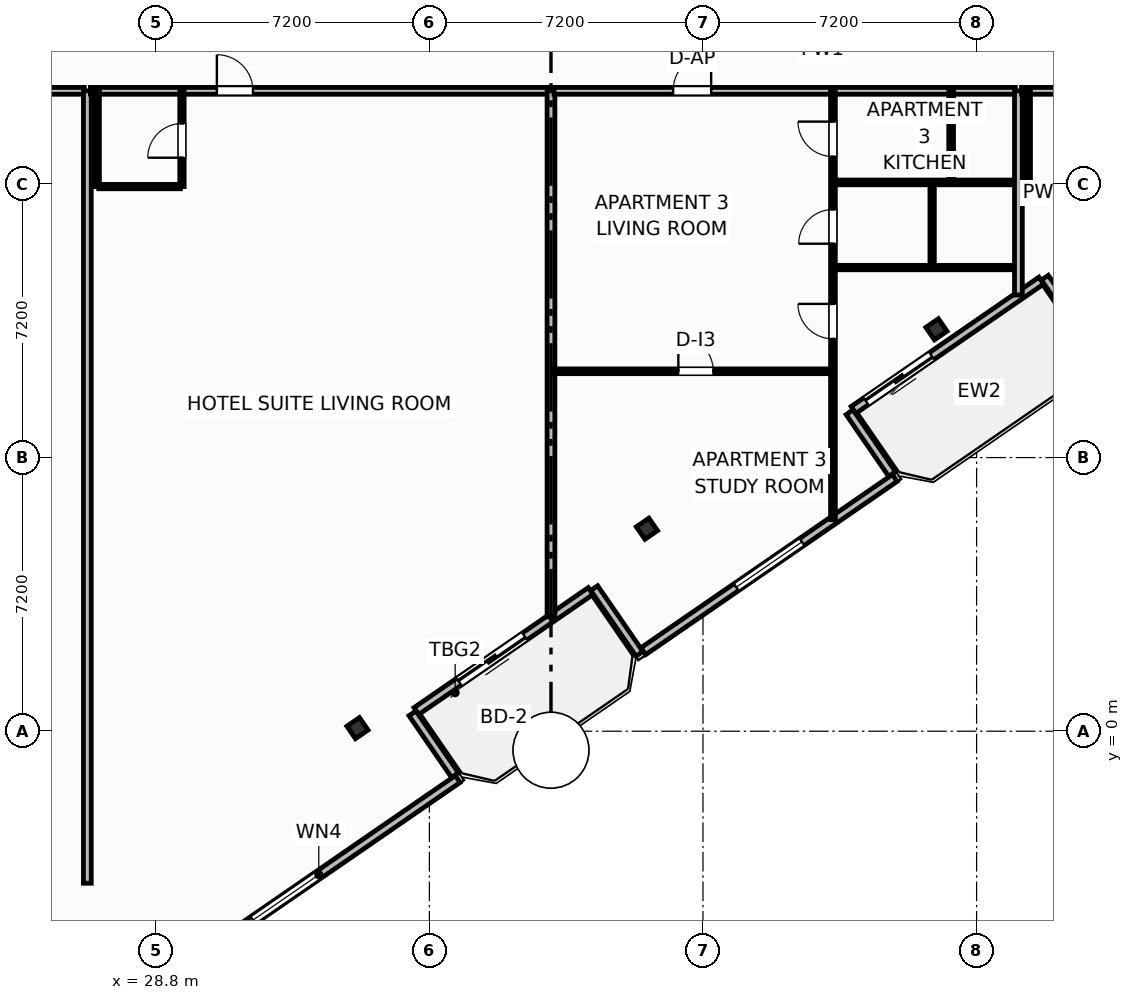
"""IFC4 building model, lengths in metres.
Left out: names, types, materials, properties, quantities, classifications, styles, units other than length and angle.
Written with IfcOpenShell. Run it as: python <this file> out.ifc"""

import sys

from ifc_helpers import new_model, si_unit, direction, frame, frame_2d, origin, origin_2d, place, context, subcontext, project, spatial, rectangle, i_section, extrude, element, fill, save


model = new_model("IFC4")
c1 = context("Model", 3, precision=1e-05, world=origin(), true_north=direction((0.0, 1.0)))
c2 = subcontext(c1, "Body", "Model", "MODEL_VIEW")
j1 = project(units=[si_unit("LENGTHUNIT", "METRE"), si_unit("PLANEANGLEUNIT", "RADIAN")], contexts=[c1])
p1 = place(None, origin())
s1 = spatial("IfcSite", under=j1, at=p1, CompositionType="ELEMENT")
p2 = place(p1, origin())
s2 = spatial("IfcBuilding", under=s1, at=p2, CompositionType="ELEMENT")
p3 = place(p2, frame((0.0, 0.0, 276.7)))
s3 = spatial("IfcBuildingStorey", under=s2, at=p3, CompositionType="ELEMENT", Elevation=276.7)
for number, where, z_axis, x_axis in (
    (1, (34.107, 0.081, 0.0), (0.0, 0.0, 1.0), (0.824, 0.567, 0.0)),
    (2, (41.725, 5.328, 0.0), (0.0, 0.0, 1.0), (0.824, 0.567, 0.0)),
    (3, (49.343, 10.575, 0.0), (0.0, 0.0, 1.0), (0.824, 0.567, 0.0)),
):
    element("IfcColumn", number, at=place(p3, frame(where, z_axis=z_axis, x_axis=x_axis)), inside=s3, PredefinedType="COLUMN", context=c2, shape_type="SweptSolid", body=[
        extrude(i_section(OverallWidth=0.401, OverallDepth=0.399, WebThickness=0.025, FlangeThickness=0.04, FilletRadius=0.022, at=origin_2d()), origin(), (0.0, 0.0, 1.0), 3.7),
    ])
p4 = place(p3, frame((40.244, 3.688, 0.0), z_axis=(0.0, 0.0, 1.0), x_axis=(-0.823541290762, -0.567256328665, 0.0)))
e4 = element("IfcWall", 4, at=p4, inside=s3, PredefinedType="SOLIDWALL", context=c2, shape_type="SweptSolid", body=[
    extrude(rectangle(XDim=5.567, YDim=0.22, at=frame_2d((2.784, 0.0))), origin(), (0.0, 0.0, 1.0), 2.73),
])
p5 = place(p4, frame((2.107, 0.0, 0.0)))
e5 = element("IfcOpeningElement", 5, at=p5, cuts=e4, PredefinedType="OPENING", context=c2, shape_type="SweptSolid", body=[
    extrude(rectangle(XDim=2.1, YDim=2.3, at=frame_2d((1.05, 1.15))), frame((0.0, 0.12, 0.0), z_axis=(0.0, -1.0, 0.0), x_axis=(1.0, 0.0, 0.0)), (0.0, 0.0, 1.0), 0.24),
])
p6 = place(p3, frame((52.103, 11.857, 0.0), z_axis=(0.0, 0.0, 1.0), x_axis=(-0.823534636215, -0.567265989598, 0.0)))
e6 = element("IfcWall", 6, at=p6, inside=s3, PredefinedType="SOLIDWALL", context=c2, shape_type="SweptSolid", body=[
    extrude(rectangle(XDim=6.0, YDim=0.22, at=frame_2d((3.0, 0.0))), origin(), (0.0, 0.0, 1.0), 2.73),
])
p7 = place(p6, frame((3.5, 0.0, 0.0)))
e7 = element("IfcOpeningElement", 7, at=p7, cuts=e6, PredefinedType="OPENING", context=c2, shape_type="SweptSolid", body=[
    extrude(rectangle(XDim=2.1, YDim=2.3, at=frame_2d((1.05, 1.15))), frame((0.0, 0.12, 0.0), z_axis=(0.0, -1.0, 0.0), x_axis=(1.0, 0.0, 0.0)), (0.0, 0.0, 1.0), 0.24),
])
p8 = place(p3, frame((27.704, -7.488, 0.0), z_axis=(0.0, 0.0, 1.0), x_axis=(0.823529068157, 0.567274073003, 0.0)))
e8 = element("IfcWall", 8, at=p8, inside=s3, PredefinedType="SOLIDWALL", context=c2, shape_type="SweptSolid", body=[
    extrude(rectangle(XDim=10.98, YDim=0.22, at=frame_2d((5.49, 0.0))), origin(), (0.0, 0.0, 1.0), 2.73),
])
p9 = place(p8, frame((4.44, 0.0, 0.8)))
e9 = element("IfcOpeningElement", 9, at=p9, cuts=e8, PredefinedType="OPENING", context=c2, shape_type="SweptSolid", body=[
    extrude(rectangle(XDim=2.1, YDim=1.75, at=frame_2d((1.05, 0.875))), frame((0.0, 0.12, 0.0), z_axis=(0.0, -1.0, 0.0), x_axis=(1.0, 0.0, 0.0)), (0.0, 0.0, 1.0), 0.24),
])
p10 = place(p3, frame((36.675, -1.156, 0.0), z_axis=(0.0, 0.0, 1.0), x_axis=(-0.567215821234, 0.823569190865, 0.0)))
e10 = element("IfcWall", 10, at=p10, inside=s3, PredefinedType="SOLIDWALL", context=c2, shape_type="SweptSolid", body=[
    extrude(rectangle(XDim=1.975, YDim=0.22, at=frame_2d((0.988, 0.0))), origin(), (0.0, 0.0, 1.0), 2.73),
])
p11 = place(p3, frame((40.337, 3.765, 0.0), z_axis=(0.0, 0.0, 1.0), x_axis=(0.567352541689, -0.823475010816, 0.0)))
e11 = element("IfcWall", 11, at=p11, inside=s3, PredefinedType="SOLIDWALL", context=c2, shape_type="SweptSolid", body=[
    extrude(rectangle(XDim=2.1, YDim=0.22, at=frame_2d((1.05, 0.0))), origin(), (0.0, 0.0, 1.0), 2.73),
])
p12 = place(p3, frame((41.631, 2.106, 0.0), z_axis=(0.0, 0.0, 1.0), x_axis=(0.823530942962, 0.56727135128, 0.0)))
e12 = element("IfcWall", 12, at=p12, inside=s3, PredefinedType="SOLIDWALL", context=c2, shape_type="SweptSolid", body=[
    extrude(rectangle(XDim=8.035, YDim=0.22, at=frame_2d((4.018, 0.0))), origin(), (0.0, 0.0, 1.0), 2.73),
])
p13 = place(p12, frame((2.968, 0.0, 0.8)))
e13 = element("IfcOpeningElement", 13, at=p13, cuts=e12, PredefinedType="OPENING", context=c2, shape_type="SweptSolid", body=[
    extrude(rectangle(XDim=2.1, YDim=1.75, at=frame_2d((1.05, 0.875))), frame((0.0, 0.12, 0.0), z_axis=(0.0, -1.0, 0.0), x_axis=(1.0, 0.0, 0.0)), (0.0, 0.0, 1.0), 0.24),
])
p14 = place(p3, frame((48.177, 6.767, 0.0), z_axis=(0.0, 0.0, 1.0), x_axis=(-0.567273565974, 0.823529417415, 0.0)))
e14 = element("IfcWall", 14, at=p14, inside=s3, PredefinedType="SOLIDWALL", context=c2, shape_type="SweptSolid", body=[
    extrude(rectangle(XDim=1.975, YDim=0.22, at=frame_2d((0.988, 0.0))), origin(), (0.0, 0.0, 1.0), 2.73),
])
p15 = place(p3, frame((52.196, 11.933, 0.0), z_axis=(0.0, 0.0, 1.0), x_axis=(0.56729822855, -0.823512428494, 0.0)))
e15 = element("IfcWall", 15, at=p15, inside=s3, PredefinedType="SOLIDWALL", context=c2, shape_type="SweptSolid", body=[
    extrude(rectangle(XDim=2.1, YDim=0.22, at=frame_2d((1.05, 0.0))), origin(), (0.0, 0.0, 1.0), 2.73),
])
p16 = place(p3, frame((5.038, 16.85, 0.0), z_axis=(0.0, 0.0, 1.0), x_axis=(1.0, 0.0, 0.0)))
e16 = element("IfcWall", 16, at=p16, inside=s3, PredefinedType="PARTITIONING", context=c2, shape_type="SweptSolid", body=[
    extrude(rectangle(XDim=21.882, YDim=0.18, at=frame_2d((10.941, 0.0))), origin(), (0.0, 0.0, 1.0), 2.739),
])
p17 = place(p16, frame((16.725, 0.0, 0.0)))
e17 = element("IfcOpeningElement", 17, at=p17, cuts=e16, PredefinedType="OPENING", context=c2, shape_type="SweptSolid", body=[
    extrude(rectangle(XDim=0.95, YDim=2.15, at=frame_2d((0.475, 1.075))), frame((0.0, 0.1, 0.0), z_axis=(0.0, -1.0, 0.0), x_axis=(1.0, 0.0, 0.0)), (0.0, 0.0, 1.0), 0.2),
])
p18 = place(p3, frame((27.0, -4.0, 0.0), z_axis=(0.0, 0.0, 1.0), x_axis=(0.0, 1.0, 0.0)))
e18 = element("IfcWall", 18, at=p18, inside=s3, PredefinedType="PARTITIONING", context=c2, shape_type="SweptSolid", body=[
    extrude(rectangle(XDim=20.85, YDim=0.205, at=frame_2d((10.425, 0.0))), origin(), (0.0, 0.0, 1.0), 3.45),
])
p19 = place(p3, frame((27.08, 16.85, 0.0), z_axis=(0.0, 0.0, 1.0), x_axis=(1.0, 0.0, 0.0)))
e19 = element("IfcWall", 19, at=p19, inside=s3, PredefinedType="PARTITIONING", context=c2, shape_type="SweptSolid", body=[
    extrude(rectangle(XDim=12.04, YDim=0.18, at=frame_2d((6.02, 0.0))), origin(), (0.0, 0.0, 1.0), 3.45),
])
p20 = place(p19, frame((3.328, 0.0, 0.0)))
e20 = element("IfcOpeningElement", 20, at=p20, cuts=e19, PredefinedType="OPENING", context=c2, shape_type="SweptSolid", body=[
    extrude(rectangle(XDim=0.95, YDim=2.15, at=frame_2d((0.475, 1.075))), frame((0.0, 0.1, 0.0), z_axis=(0.0, -1.0, 0.0), x_axis=(1.0, 0.0, 0.0)), (0.0, 0.0, 1.0), 0.2),
])
p21 = place(p3, frame((27.3, 14.33, 0.0), z_axis=(0.0, 0.0, 1.0), x_axis=(1.0, 0.0, 0.0)))
e21 = element("IfcWall", 21, at=p21, inside=s3, PredefinedType="PARTITIONING", context=c2, shape_type="SweptSolid", body=[
    extrude(rectangle(XDim=2.15, YDim=0.115, at=frame_2d((1.075, 0.0))), origin(), (0.0, 0.0, 1.0), 3.45),
])
p22 = place(p3, frame((29.49, 14.33, 0.0), z_axis=(0.0, 0.0, 1.0), x_axis=(0.0, 1.0, 0.0)))
e22 = element("IfcWall", 22, at=p22, inside=s3, PredefinedType="PARTITIONING", context=c2, shape_type="SweptSolid", body=[
    extrude(rectangle(XDim=2.52, YDim=0.115, at=frame_2d((1.26, 0.0))), origin(), (0.0, 0.0, 1.0), 3.45),
])
p23 = place(p22, frame((0.76, 0.0, 0.0)))
e23 = element("IfcOpeningElement", 23, at=p23, cuts=e22, PredefinedType="OPENING", context=c2, shape_type="SweptSolid", body=[
    extrude(rectangle(XDim=0.9, YDim=2.05, at=frame_2d((0.45, 1.025))), frame((0.0, 0.067, 0.0), z_axis=(0.0, -1.0, 0.0), x_axis=(1.0, 0.0, 0.0)), (0.0, 0.0, 1.0), 0.135),
])
p24 = place(p3, frame((27.26, 14.33, 0.0), z_axis=(0.0, 0.0, 1.0), x_axis=(0.0, 1.0, 0.0)))
e24 = element("IfcWall", 24, at=p24, inside=s3, PredefinedType="PARTITIONING", context=c2, shape_type="SweptSolid", body=[
    extrude(rectangle(XDim=2.52, YDim=0.115, at=frame_2d((1.26, 0.0))), origin(), (0.0, 0.0, 1.0), 3.45),
])
p25 = place(p3, frame((39.2, 3.006, 0.0), z_axis=(0.0, 0.0, 1.0), x_axis=(0.0, 1.0, 0.0)))
e25 = element("IfcWall", 25, at=p25, inside=s3, PredefinedType="PARTITIONING", context=c2, shape_type="SweptSolid", body=[
    extrude(rectangle(XDim=13.844, YDim=0.205, at=frame_2d((6.922, 0.0))), origin(), (0.0, 0.0, 1.0), 3.45),
])
p26 = place(p3, frame((39.28, 9.47, 0.0), z_axis=(0.0, 0.0, 1.0), x_axis=(1.0, 0.0, 0.0)))
e26 = element("IfcWall", 26, at=p26, inside=s3, PredefinedType="PARTITIONING", context=c2, shape_type="SweptSolid", body=[
    extrude(rectangle(XDim=7.27, YDim=0.125, at=frame_2d((3.635, 0.0))), origin(), (0.0, 0.0, 1.0), 3.45),
])
p27 = place(p26, frame((3.271, 0.0, 0.0)))
e27 = element("IfcOpeningElement", 27, at=p27, cuts=e26, PredefinedType="OPENING", context=c2, shape_type="SweptSolid", body=[
    extrude(rectangle(XDim=0.92, YDim=2.05, at=frame_2d((0.46, 1.025))), frame((0.0, 0.073, 0.0), z_axis=(0.0, -1.0, 0.0), x_axis=(1.0, 0.0, 0.0)), (0.0, 0.0, 1.0), 0.145),
])
p28 = place(p3, frame((39.28, 16.85, 0.0), z_axis=(0.0, 0.0, 1.0), x_axis=(1.0, 0.0, 0.0)))
e28 = element("IfcWall", 28, at=p28, inside=s3, PredefinedType="PARTITIONING", context=c2, shape_type="SweptSolid", body=[
    extrude(rectangle(XDim=12.14, YDim=0.18, at=frame_2d((6.07, 0.0))), origin(), (0.0, 0.0, 1.0), 3.45),
])
p29 = place(p28, frame((3.135, 0.0, 0.0)))
e29 = element("IfcOpeningElement", 29, at=p29, cuts=e28, PredefinedType="OPENING", context=c2, shape_type="SweptSolid", body=[
    extrude(rectangle(XDim=1.0, YDim=2.2, at=frame_2d((0.5, 1.1))), frame((0.0, 0.1, 0.0), z_axis=(0.0, -1.0, 0.0), x_axis=(1.0, 0.0, 0.0)), (0.0, 0.0, 1.0), 0.2),
])
p30 = place(p3, frame((46.62, 5.567, 0.0), z_axis=(0.0, 0.0, 1.0), x_axis=(0.0, 1.0, 0.0)))
e30 = element("IfcWall", 30, at=p30, inside=s3, PredefinedType="PARTITIONING", context=c2, shape_type="SweptSolid", body=[
    extrude(rectangle(XDim=11.283, YDim=0.125, at=frame_2d((5.642, 0.0))), origin(), (0.0, 0.0, 1.0), 3.45),
])
p31 = place(p30, frame((4.757, 0.0, 0.0)))
e31 = element("IfcOpeningElement", 31, at=p31, cuts=e30, PredefinedType="OPENING", context=c2, shape_type="SweptSolid", body=[
    extrude(rectangle(XDim=0.92, YDim=2.05, at=frame_2d((0.46, 1.025))), frame((0.0, 0.073, 0.0), z_axis=(0.0, -1.0, 0.0), x_axis=(1.0, 0.0, 0.0)), (0.0, 0.0, 1.0), 0.145),
])
p32 = place(p30, frame((7.26, 0.0, 0.0)))
e32 = element("IfcOpeningElement", 32, at=p32, cuts=e30, PredefinedType="OPENING", context=c2, shape_type="SweptSolid", body=[
    extrude(rectangle(XDim=0.9, YDim=2.05, at=frame_2d((0.45, 1.025))), frame((0.0, 0.073, 0.0), z_axis=(0.0, -1.0, 0.0), x_axis=(1.0, 0.0, 0.0)), (0.0, 0.0, 1.0), 0.145),
])
p33 = place(p30, frame((9.553, 0.0, 0.0)))
e33 = element("IfcOpeningElement", 33, at=p33, cuts=e30, PredefinedType="OPENING", context=c2, shape_type="SweptSolid", body=[
    extrude(rectangle(XDim=0.92, YDim=2.05, at=frame_2d((0.46, 1.025))), frame((0.0, 0.073, 0.0), z_axis=(0.0, -1.0, 0.0), x_axis=(1.0, 0.0, 0.0)), (0.0, 0.0, 1.0), 0.145),
])
p34 = place(p3, frame((46.69, 14.44, 0.0), z_axis=(0.0, 0.0, 1.0), x_axis=(1.0, 0.0, 0.0)))
e34 = element("IfcWall", 34, at=p34, inside=s3, PredefinedType="PARTITIONING", context=c2, shape_type="SweptSolid", body=[
    extrude(rectangle(XDim=4.73, YDim=0.125, at=frame_2d((2.365, 0.0))), origin(), (0.0, 0.0, 1.0), 3.45),
])
p35 = place(p3, frame((46.69, 12.2, 0.0), z_axis=(0.0, 0.0, 1.0), x_axis=(1.0, 0.0, 0.0)))
e35 = element("IfcWall", 35, at=p35, inside=s3, PredefinedType="PARTITIONING", context=c2, shape_type="SweptSolid", body=[
    extrude(rectangle(XDim=4.73, YDim=0.115, at=frame_2d((2.365, 0.0))), origin(), (0.0, 0.0, 1.0), 3.45),
])
p36 = place(p3, frame((49.73, 14.44, 0.0), z_axis=(0.0, 0.0, 1.0), x_axis=(0.0, 1.0, 0.0)))
e36 = element("IfcWall", 36, at=p36, inside=s3, PredefinedType="PARTITIONING", context=c2, shape_type="SweptSolid", body=[
    extrude(rectangle(XDim=2.41, YDim=0.125, at=frame_2d((1.205, 0.0))), origin(), (0.0, 0.0, 1.0), 3.45),
])
p37 = place(p3, frame((49.23, 12.2, 0.0), z_axis=(0.0, 0.0, 1.0), x_axis=(0.0, 1.0, 0.0)))
e37 = element("IfcWall", 37, at=p37, inside=s3, PredefinedType="PARTITIONING", context=c2, shape_type="SweptSolid", body=[
    extrude(rectangle(XDim=2.24, YDim=0.115, at=frame_2d((1.12, 0.0))), origin(), (0.0, 0.0, 1.0), 3.45),
])
p38 = place(p3, frame((51.5, 11.479, 0.0), z_axis=(0.0, 0.0, 1.0), x_axis=(0.0, 1.0, 0.0)))
e38 = element("IfcWall", 38, at=p38, inside=s3, PredefinedType="PARTITIONING", context=c2, shape_type="SweptSolid", body=[
    extrude(rectangle(XDim=5.372, YDim=0.205, at=frame_2d((2.686, 0.0))), origin(), (0.0, 0.0, 1.0), 3.45),
])
p39 = place(p3, frame((51.58, 16.85, 0.0), z_axis=(0.0, 0.0, 1.0), x_axis=(1.0, 0.0, 0.0)))
e39 = element("IfcWall", 39, at=p39, inside=s3, PredefinedType="PARTITIONING", context=c2, shape_type="SweptSolid", body=[
    extrude(rectangle(XDim=7.718, YDim=0.18, at=frame_2d((3.859, 0.0))), origin(), (0.0, 0.0, 1.0), 3.45),
])
p40 = place(p39, frame((3.326, 0.0, 0.0)))
e40 = element("IfcOpeningElement", 40, at=p40, cuts=e39, PredefinedType="OPENING", context=c2, shape_type="SweptSolid", body=[
    extrude(rectangle(XDim=0.95, YDim=2.15, at=frame_2d((0.475, 1.075))), frame((0.0, 0.1, 0.0), z_axis=(0.0, -1.0, 0.0), x_axis=(1.0, 0.0, 0.0)), (0.0, 0.0, 1.0), 0.2),
])
p41 = place(p3, frame((51.8, 14.33, 0.0), z_axis=(0.0, 0.0, 1.0), x_axis=(1.0, 0.0, 0.0)))
e41 = element("IfcWall", 41, at=p41, inside=s3, PredefinedType="PARTITIONING", context=c2, shape_type="SweptSolid", body=[
    extrude(rectangle(XDim=2.15, YDim=0.115, at=frame_2d((1.075, 0.0))), origin(), (0.0, 0.0, 1.0), 3.45),
])
p42 = place(p3, frame((51.76, 14.33, 0.0), z_axis=(0.0, 0.0, 1.0), x_axis=(0.0, 1.0, 0.0)))
e42 = element("IfcWall", 42, at=p42, inside=s3, PredefinedType="PARTITIONING", context=c2, shape_type="SweptSolid", body=[
    extrude(rectangle(XDim=2.52, YDim=0.115, at=frame_2d((1.26, 0.0))), origin(), (0.0, 0.0, 1.0), 3.45),
])
p43 = place(p5, origin())
e43 = element("IfcDoor", 43, at=p43, inside=s3, OperationType="SLIDING_TO_LEFT", PredefinedType="DOOR", context=c2, shape_type="SweptSolid", body=[
    extrude(rectangle(XDim=2.1, YDim=2.3, at=frame_2d((1.05, 1.15))), frame((0.0, 0.025, 0.0), z_axis=(0.0, -1.0, 0.0), x_axis=(1.0, 0.0, 0.0)), (0.0, 0.0, 1.0), 0.05),
])
fill(e5, e43)
p44 = place(p7, origin())
e44 = element("IfcDoor", 44, at=p44, inside=s3, OperationType="SLIDING_TO_LEFT", PredefinedType="DOOR", context=c2, shape_type="SweptSolid", body=[
    extrude(rectangle(XDim=2.1, YDim=2.3, at=frame_2d((1.05, 1.15))), frame((0.0, 0.025, 0.0), z_axis=(0.0, -1.0, 0.0), x_axis=(1.0, 0.0, 0.0)), (0.0, 0.0, 1.0), 0.05),
])
fill(e7, e44)
p45 = place(p9, origin())
e45 = element("IfcWindow", 45, at=p45, inside=s3, PartitioningType="SINGLE_PANEL", PredefinedType="WINDOW", context=c2, shape_type="SweptSolid", body=[
    extrude(rectangle(XDim=2.1, YDim=1.75, at=frame_2d((1.05, 0.875))), frame((0.0, 0.03, 0.0), z_axis=(0.0, -1.0, 0.0), x_axis=(1.0, 0.0, 0.0)), (0.0, 0.0, 1.0), 0.06),
])
fill(e9, e45)
p46 = place(p13, origin())
e46 = element("IfcWindow", 46, at=p46, inside=s3, PartitioningType="SINGLE_PANEL", PredefinedType="WINDOW", context=c2, shape_type="SweptSolid", body=[
    extrude(rectangle(XDim=2.1, YDim=1.75, at=frame_2d((1.05, 0.875))), frame((0.0, 0.03, 0.0), z_axis=(0.0, -1.0, 0.0), x_axis=(1.0, 0.0, 0.0)), (0.0, 0.0, 1.0), 0.06),
])
fill(e13, e46)
p47 = place(p20, origin())
e47 = element("IfcDoor", 47, at=p47, inside=s3, OperationType="SINGLE_SWING_LEFT", PredefinedType="DOOR", context=c2, shape_type="SweptSolid", body=[
    extrude(rectangle(XDim=0.95, YDim=2.15, at=frame_2d((0.475, 1.075))), frame((0.0, 0.025, 0.0), z_axis=(0.0, -1.0, 0.0), x_axis=(1.0, 0.0, 0.0)), (0.0, 0.0, 1.0), 0.05),
])
fill(e20, e47)
p48 = place(p23, origin())
e48 = element("IfcDoor", 48, at=p48, inside=s3, OperationType="SINGLE_SWING_LEFT", PredefinedType="DOOR", context=c2, shape_type="SweptSolid", body=[
    extrude(rectangle(XDim=0.9, YDim=2.05, at=frame_2d((0.45, 1.025))), frame((0.0, 0.025, 0.0), z_axis=(0.0, -1.0, 0.0), x_axis=(1.0, 0.0, 0.0)), (0.0, 0.0, 1.0), 0.05),
])
fill(e23, e48)
p49 = place(p27, origin())
e49 = element("IfcDoor", 49, at=p49, inside=s3, OperationType="SINGLE_SWING_LEFT", PredefinedType="DOOR", context=c2, shape_type="SweptSolid", body=[
    extrude(rectangle(XDim=0.92, YDim=2.05, at=frame_2d((0.46, 1.025))), frame((0.0, 0.025, 0.0), z_axis=(0.0, -1.0, 0.0), x_axis=(1.0, 0.0, 0.0)), (0.0, 0.0, 1.0), 0.05),
])
fill(e27, e49)
p50 = place(p29, origin())
e50 = element("IfcDoor", 50, at=p50, inside=s3, OperationType="SINGLE_SWING_RIGHT", PredefinedType="DOOR", context=c2, shape_type="SweptSolid", body=[
    extrude(rectangle(XDim=1.0, YDim=2.2, at=frame_2d((0.5, 1.1))), frame((0.0, 0.025, 0.0), z_axis=(0.0, -1.0, 0.0), x_axis=(1.0, 0.0, 0.0)), (0.0, 0.0, 1.0), 0.05),
])
fill(e29, e50)
p51 = place(p31, origin())
e51 = element("IfcDoor", 51, at=p51, inside=s3, OperationType="SINGLE_SWING_RIGHT", PredefinedType="DOOR", context=c2, shape_type="SweptSolid", body=[
    extrude(rectangle(XDim=0.92, YDim=2.05, at=frame_2d((0.46, 1.025))), frame((0.0, 0.025, 0.0), z_axis=(0.0, -1.0, 0.0), x_axis=(1.0, 0.0, 0.0)), (0.0, 0.0, 1.0), 0.05),
])
fill(e31, e51)
p52 = place(p32, origin())
e52 = element("IfcDoor", 52, at=p52, inside=s3, OperationType="SINGLE_SWING_LEFT", PredefinedType="DOOR", context=c2, shape_type="SweptSolid", body=[
    extrude(rectangle(XDim=0.9, YDim=2.05, at=frame_2d((0.45, 1.025))), frame((0.0, 0.025, 0.0), z_axis=(0.0, -1.0, 0.0), x_axis=(1.0, 0.0, 0.0)), (0.0, 0.0, 1.0), 0.05),
])
fill(e32, e52)
p53 = place(p33, origin())
e53 = element("IfcDoor", 53, at=p53, inside=s3, OperationType="SINGLE_SWING_RIGHT", PredefinedType="DOOR", context=c2, shape_type="SweptSolid", body=[
    extrude(rectangle(XDim=0.92, YDim=2.05, at=frame_2d((0.46, 1.025))), frame((0.0, 0.025, 0.0), z_axis=(0.0, -1.0, 0.0), x_axis=(1.0, 0.0, 0.0)), (0.0, 0.0, 1.0), 0.05),
])
fill(e33, e53)
save(model, sys.argv[1])
